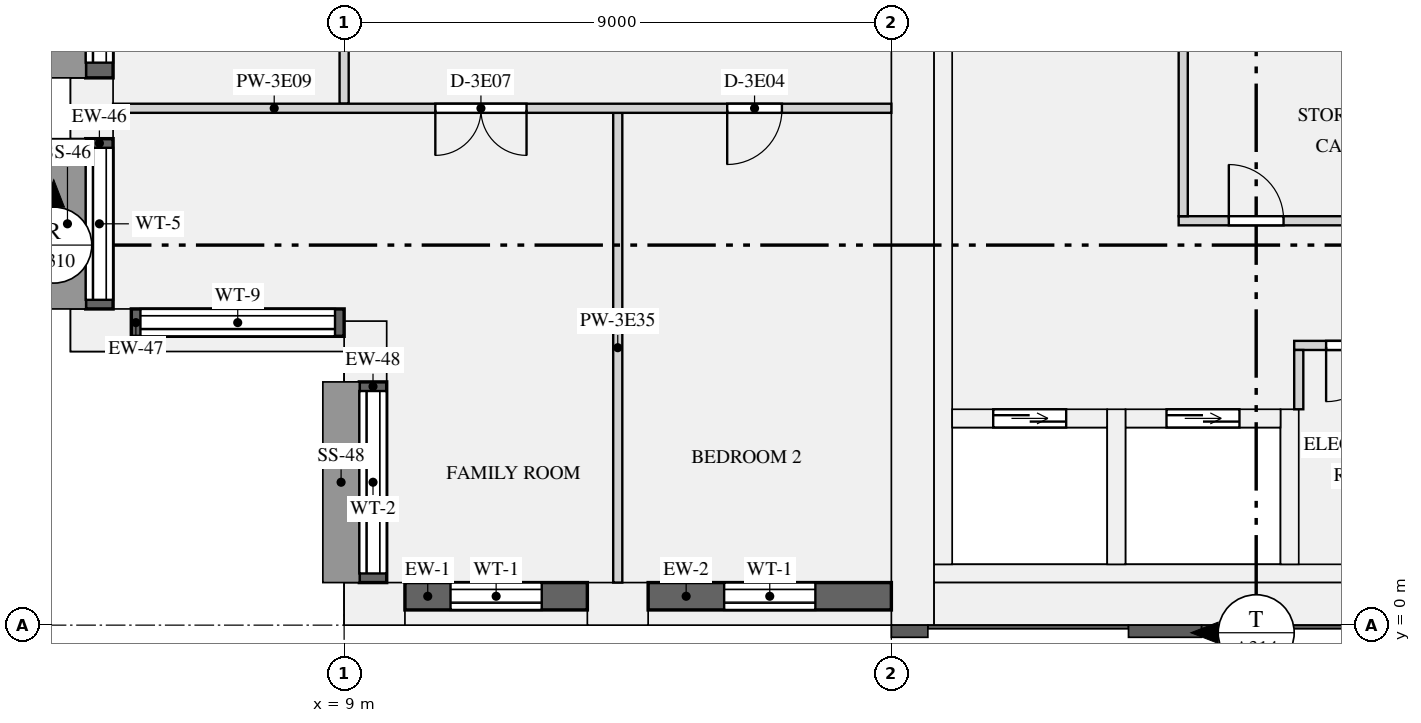
"""IFC4 building model, lengths in metres.
Left out: names, types, materials, properties, quantities, classifications, styles, units other than length and angle.
Written with IfcOpenShell. Run it as: python <this file> out.ifc"""

import sys

from ifc_helpers import new_model, si_unit, direction, frame, frame_2d, origin, origin_2d, place, context, subcontext, project, spatial, rectangle, extrude, element, fill, save


model = new_model("IFC4")
c1 = context("Model", 3, precision=1e-05, world=origin(), true_north=direction((0.0, 1.0)))
c2 = subcontext(c1, "Body", "Model", "MODEL_VIEW")
j1 = project(units=[si_unit("LENGTHUNIT", "METRE"), si_unit("PLANEANGLEUNIT", "RADIAN")], contexts=[c1])
p1 = place(None, origin())
s1 = spatial("IfcSite", under=j1, at=p1, CompositionType="ELEMENT")
p2 = place(p1, origin())
s2 = spatial("IfcBuilding", under=s1, at=p2, CompositionType="ELEMENT")
p3 = place(p2, frame((0.0, 0.0, 172.8)))
s3 = spatial("IfcBuildingStorey", under=s2, at=p3, CompositionType="ELEMENT", Elevation=172.8)
for number, where, z_axis, x_axis in (
    (1, (9.5, 0.35, 0.0), (0.0, 0.0, 1.0), (1.0, 0.0, 0.0)),
    (2, (13.5, 0.35, 0.0), (0.0, 0.0, 1.0), (1.0, 0.0, 0.0)),
    (3, (4.85, 8.5, 0.0), (0.0, 0.0, 1.0), (0.0, -1.0, 0.0)),
    (4, (5.0, 4.85, 0.0), (0.0, 0.0, 1.0), (1.0, 0.0, 0.0)),
    (5, (9.35, 4.5, 0.0), (0.0, 0.0, 1.0), (0.0, -1.0, 0.0)),
):
    element("IfcColumn", number, at=place(p3, frame(where, z_axis=z_axis, x_axis=x_axis)), inside=s3, PredefinedType="USERDEFINED", context=c2, shape_type="SweptSolid", body=[
        extrude(rectangle(XDim=1.0, YDim=0.7, at=origin_2d()), origin(), (0.0, 0.0, 1.0), 3.15),
    ])
p4 = place(p3, frame((18.35, 0.0, 0.0), z_axis=(0.0, 0.0, 1.0), x_axis=(0.0, 1.0, 0.0)))
e6 = element("IfcWall", 6, at=p4, inside=s3, PredefinedType="SHEAR", context=c2, shape_type="SweptSolid", body=[
    extrude(rectangle(XDim=12.5, YDim=0.7, at=frame_2d((6.25, 0.0))), origin(), (0.0, 0.0, 1.0), 3.15),
])
p5 = place(p3, frame((18.7, 0.35, 0.0), z_axis=(0.0, 0.0, 1.0), x_axis=(1.0, 0.0, 0.0)))
e7 = element("IfcWall", 7, at=p5, inside=s3, PredefinedType="SHEAR", context=c2, shape_type="SweptSolid", body=[
    extrude(rectangle(XDim=34.6, YDim=0.7, at=frame_2d((17.3, 0.0))), origin(), (0.0, 0.0, 1.0), 3.15),
])
p6 = place(p3, frame((18.85, 1.0, 0.0), z_axis=(0.0, 0.0, 1.0), x_axis=(0.0, 1.0, 0.0)))
e8 = element("IfcWall", 8, at=p6, inside=s3, PredefinedType="SHEAR", context=c2, shape_type="SweptSolid", body=[
    extrude(rectangle(XDim=10.9, YDim=0.3, at=frame_2d((5.45, 0.0))), origin(), (0.0, 0.0, 1.0), 3.15),
])
p7 = place(p3, frame((18.7, 0.85, 0.0), z_axis=(0.0, 0.0, 1.0), x_axis=(1.0, 0.0, 0.0)))
e9 = element("IfcWall", 9, at=p7, inside=s3, PredefinedType="SHEAR", context=c2, shape_type="SweptSolid", body=[
    extrude(rectangle(XDim=34.6, YDim=0.3, at=frame_2d((17.3, 0.0))), origin(), (0.0, 0.0, 1.0), 3.15),
])
p8 = place(p3, frame((19.0, 3.4, 0.0), z_axis=(0.0, 0.0, 1.0), x_axis=(1.0, 0.0, 0.0)))
e10 = element("IfcWall", 10, at=p8, inside=s3, PredefinedType="SHEAR", context=c2, shape_type="SweptSolid", body=[
    extrude(rectangle(XDim=2.55, YDim=0.3, at=frame_2d((1.275, 0.0))), origin(), (0.0, 0.0, 1.0), 3.15),
])
p9 = place(p8, frame((0.675, 0.0, 0.0)))
e11 = element("IfcOpeningElement", 11, at=p9, cuts=e10, PredefinedType="OPENING", context=c2, shape_type="SweptSolid", body=[
    extrude(rectangle(XDim=1.2, YDim=2.1, at=frame_2d((0.6, 1.05))), frame((0.0, 0.16, 0.0), z_axis=(0.0, -1.0, 0.0), x_axis=(1.0, 0.0, 0.0)), (0.0, 0.0, 1.0), 0.32),
])
p10 = place(p3, frame((21.85, 3.4, 0.0), z_axis=(0.0, 0.0, 1.0), x_axis=(1.0, 0.0, 0.0)))
e12 = element("IfcWall", 12, at=p10, inside=s3, PredefinedType="SHEAR", context=c2, shape_type="SweptSolid", body=[
    extrude(rectangle(XDim=2.55, YDim=0.3, at=frame_2d((1.275, 0.0))), origin(), (0.0, 0.0, 1.0), 3.15),
])
p11 = place(p10, frame((0.675, 0.0, 0.0)))
e13 = element("IfcOpeningElement", 13, at=p11, cuts=e12, PredefinedType="OPENING", context=c2, shape_type="SweptSolid", body=[
    extrude(rectangle(XDim=1.2, YDim=2.1, at=frame_2d((0.6, 1.05))), frame((0.0, 0.16, 0.0), z_axis=(0.0, -1.0, 0.0), x_axis=(1.0, 0.0, 0.0)), (0.0, 0.0, 1.0), 0.32),
])
for number, where, z_axis, x_axis in (
    (14, (21.7, 1.0, 0.0), (0.0, 0.0, 1.0), (0.0, 1.0, 0.0)),
    (15, (24.55, 1.0, 0.0), (0.0, 0.0, 1.0), (0.0, 1.0, 0.0)),
):
    element("IfcWall", number, at=place(p3, frame(where, z_axis=z_axis, x_axis=x_axis)), inside=s3, PredefinedType="SHEAR", context=c2, shape_type="SweptSolid", body=[
        extrude(rectangle(XDim=2.55, YDim=0.3, at=frame_2d((1.275, 0.0))), origin(), (0.0, 0.0, 1.0), 3.15),
    ])
p12 = place(p3, frame((10.0, 0.475, 0.9), z_axis=(0.0, 0.0, 1.0), x_axis=(1.0, 0.0, 0.0)))
e16 = element("IfcWall", 16, at=p12, inside=s3, PredefinedType="SOLIDWALL", context=c2, shape_type="SweptSolid", body=[
    extrude(rectangle(XDim=3.0, YDim=0.45, at=frame_2d((1.5, 0.0))), origin(), (0.0, 0.0, 1.0), 1.93),
])
p13 = place(p12, frame((0.75, 0.0, 0.15)))
e17 = element("IfcOpeningElement", 17, at=p13, cuts=e16, PredefinedType="OPENING", context=c2, shape_type="SweptSolid", body=[
    extrude(rectangle(XDim=1.5, YDim=1.5, at=frame_2d((0.75, 0.75))), frame((0.0, 0.235, 0.0), z_axis=(0.0, -1.0, 0.0), x_axis=(1.0, 0.0, 0.0)), (0.0, 0.0, 1.0), 0.47),
])
p14 = place(p3, frame((14.0, 0.475, 0.9), z_axis=(0.0, 0.0, 1.0), x_axis=(1.0, 0.0, 0.0)))
e18 = element("IfcWall", 18, at=p14, inside=s3, PredefinedType="SOLIDWALL", context=c2, shape_type="SweptSolid", body=[
    extrude(rectangle(XDim=4.0, YDim=0.45, at=frame_2d((2.0, 0.0))), origin(), (0.0, 0.0, 1.0), 1.93),
])
p15 = place(p14, frame((1.25, 0.0, 0.15)))
e19 = element("IfcOpeningElement", 19, at=p15, cuts=e18, PredefinedType="OPENING", context=c2, shape_type="SweptSolid", body=[
    extrude(rectangle(XDim=1.5, YDim=1.5, at=frame_2d((0.75, 0.75))), frame((0.0, 0.235, 0.0), z_axis=(0.0, -1.0, 0.0), x_axis=(1.0, 0.0, 0.0)), (0.0, 0.0, 1.0), 0.47),
])
p16 = place(p3, frame((4.975, 12.0, 0.9), z_axis=(0.0, 0.0, 1.0), x_axis=(0.0, -1.0, 0.0)))
e20 = element("IfcWall", 20, at=p16, inside=s3, PredefinedType="SOLIDWALL", context=c2, shape_type="SweptSolid", body=[
    extrude(rectangle(XDim=3.0, YDim=0.45, at=frame_2d((1.5, 0.0))), origin(), (0.0, 0.0, 1.0), 1.93),
])
p17 = place(p16, frame((0.25, 0.0, 0.15)))
e21 = element("IfcOpeningElement", 21, at=p17, cuts=e20, PredefinedType="OPENING", context=c2, shape_type="SweptSolid", body=[
    extrude(rectangle(XDim=2.5, YDim=1.5, at=frame_2d((1.25, 0.75))), frame((0.0, 0.235, 0.0), z_axis=(0.0, -1.0, 0.0), x_axis=(1.0, 0.0, 0.0)), (0.0, 0.0, 1.0), 0.47),
])
p18 = place(p3, frame((4.975, 8.0, 0.9), z_axis=(0.0, 0.0, 1.0), x_axis=(0.0, -1.0, 0.0)))
e22 = element("IfcWall", 22, at=p18, inside=s3, PredefinedType="SOLIDWALL", context=c2, shape_type="SweptSolid", body=[
    extrude(rectangle(XDim=2.8, YDim=0.45, at=frame_2d((1.4, 0.0))), origin(), (0.0, 0.0, 1.0), 1.93),
])
p19 = place(p18, frame((0.15, 0.0, 0.15)))
e23 = element("IfcOpeningElement", 23, at=p19, cuts=e22, PredefinedType="OPENING", context=c2, shape_type="SweptSolid", body=[
    extrude(rectangle(XDim=2.5, YDim=1.5, at=frame_2d((1.25, 0.75))), frame((0.0, 0.235, 0.0), z_axis=(0.0, -1.0, 0.0), x_axis=(1.0, 0.0, 0.0)), (0.0, 0.0, 1.0), 0.47),
])
p20 = place(p3, frame((5.5, 4.975, 0.9), z_axis=(0.0, 0.0, 1.0), x_axis=(1.0, 0.0, 0.0)))
e24 = element("IfcWall", 24, at=p20, inside=s3, PredefinedType="SOLIDWALL", context=c2, shape_type="SweptSolid", body=[
    extrude(rectangle(XDim=3.5, YDim=0.45, at=frame_2d((1.75, 0.0))), origin(), (0.0, 0.0, 1.0), 1.93),
])
p21 = place(p20, frame((0.15, 0.0, 0.15)))
e25 = element("IfcOpeningElement", 25, at=p21, cuts=e24, PredefinedType="OPENING", context=c2, shape_type="SweptSolid", body=[
    extrude(rectangle(XDim=3.2, YDim=1.5, at=frame_2d((1.6, 0.75))), frame((0.0, 0.235, 0.0), z_axis=(0.0, -1.0, 0.0), x_axis=(1.0, 0.0, 0.0)), (0.0, 0.0, 1.0), 0.47),
])
p22 = place(p3, frame((9.475, 4.0, 0.9), z_axis=(0.0, 0.0, 1.0), x_axis=(0.0, -1.0, 0.0)))
e26 = element("IfcWall", 26, at=p22, inside=s3, PredefinedType="SOLIDWALL", context=c2, shape_type="SweptSolid", body=[
    extrude(rectangle(XDim=3.3, YDim=0.45, at=frame_2d((1.65, 0.0))), origin(), (0.0, 0.0, 1.0), 1.93),
])
p23 = place(p22, frame((0.15, 0.0, 0.15)))
e27 = element("IfcOpeningElement", 27, at=p23, cuts=e26, PredefinedType="OPENING", context=c2, shape_type="SweptSolid", body=[
    extrude(rectangle(XDim=3.0, YDim=1.5, at=frame_2d((1.5, 0.75))), frame((0.0, 0.235, 0.0), z_axis=(0.0, -1.0, 0.0), x_axis=(1.0, 0.0, 0.0)), (0.0, 0.0, 1.0), 0.47),
])
p24 = place(p3, frame((24.625, 4.6, 0.0), z_axis=(0.0, 0.0, 1.0), x_axis=(1.0, 0.0, 0.0)))
e28 = element("IfcWall", 28, at=p24, inside=s3, PredefinedType="PARTITIONING", context=c2, shape_type="SweptSolid", body=[
    extrude(rectangle(XDim=2.675, YDim=0.15, at=frame_2d((1.337, 0.0))), origin(), (0.0, 0.0, 1.0), 2.83),
])
p25 = place(p24, frame((0.525, 0.0, 0.0)))
e29 = element("IfcOpeningElement", 29, at=p25, cuts=e28, PredefinedType="OPENING", context=c2, shape_type="SweptSolid", body=[
    extrude(rectangle(XDim=0.9, YDim=2.1, at=frame_2d((0.45, 1.05))), frame((0.0, 0.085, 0.0), z_axis=(0.0, -1.0, 0.0), x_axis=(1.0, 0.0, 0.0)), (0.0, 0.0, 1.0), 0.17),
])
p26 = place(p3, frame((22.725, 6.65, 0.0), z_axis=(0.0, 0.0, 1.0), x_axis=(1.0, 0.0, 0.0)))
e30 = element("IfcWall", 30, at=p26, inside=s3, PredefinedType="PARTITIONING", context=c2, shape_type="SweptSolid", body=[
    extrude(rectangle(XDim=19.8, YDim=0.15, at=frame_2d((9.9, 0.0))), origin(), (0.0, 0.0, 1.0), 2.83),
])
p27 = place(p26, frame((0.825, 0.0, 0.0)))
e31 = element("IfcOpeningElement", 31, at=p27, cuts=e30, PredefinedType="OPENING", context=c2, shape_type="SweptSolid", body=[
    extrude(rectangle(XDim=0.9, YDim=2.1, at=frame_2d((0.45, 1.05))), frame((0.0, 0.085, 0.0), z_axis=(0.0, -1.0, 0.0), x_axis=(1.0, 0.0, 0.0)), (0.0, 0.0, 1.0), 0.17),
])
p28 = place(p26, frame((5.825, 0.0, 0.0)))
e32 = element("IfcOpeningElement", 32, at=p28, cuts=e30, PredefinedType="OPENING", context=c2, shape_type="SweptSolid", body=[
    extrude(rectangle(XDim=0.9, YDim=2.1, at=frame_2d((0.45, 1.05))), frame((0.0, 0.085, 0.0), z_axis=(0.0, -1.0, 0.0), x_axis=(1.0, 0.0, 0.0)), (0.0, 0.0, 1.0), 0.17),
])
p29 = place(p26, frame((10.325, 0.0, 0.0)))
e33 = element("IfcOpeningElement", 33, at=p29, cuts=e30, PredefinedType="OPENING", context=c2, shape_type="SweptSolid", body=[
    extrude(rectangle(XDim=0.9, YDim=2.1, at=frame_2d((0.45, 1.05))), frame((0.0, 0.085, 0.0), z_axis=(0.0, -1.0, 0.0), x_axis=(1.0, 0.0, 0.0)), (0.0, 0.0, 1.0), 0.17),
])
p30 = place(p26, frame((14.475, 0.0, 0.0)))
e34 = element("IfcOpeningElement", 34, at=p30, cuts=e30, PredefinedType="OPENING", context=c2, shape_type="SweptSolid", body=[
    extrude(rectangle(XDim=0.9, YDim=2.1, at=frame_2d((0.45, 1.05))), frame((0.0, 0.085, 0.0), z_axis=(0.0, -1.0, 0.0), x_axis=(1.0, 0.0, 0.0)), (0.0, 0.0, 1.0), 0.17),
])
p31 = place(p3, frame((24.7, 3.55, 0.0), z_axis=(0.0, 0.0, 1.0), x_axis=(0.0, 1.0, 0.0)))
e35 = element("IfcWall", 35, at=p31, inside=s3, PredefinedType="PARTITIONING", context=c2, shape_type="SweptSolid", body=[
    extrude(rectangle(XDim=0.975, YDim=0.15, at=frame_2d((0.487, 0.0))), origin(), (0.0, 0.0, 1.0), 2.83),
])
p32 = place(p3, frame((22.8, 6.725, 0.0), z_axis=(0.0, 0.0, 1.0), x_axis=(0.0, 1.0, 0.0)))
e36 = element("IfcWall", 36, at=p32, inside=s3, PredefinedType="PARTITIONING", context=c2, shape_type="SweptSolid", body=[
    extrude(rectangle(XDim=5.175, YDim=0.15, at=frame_2d((2.587, 0.0))), origin(), (0.0, 0.0, 1.0), 2.83),
])
p33 = place(p3, frame((5.2, 8.5, 0.0), z_axis=(0.0, 0.0, 1.0), x_axis=(1.0, 0.0, 0.0)))
e37 = element("IfcWall", 37, at=p33, inside=s3, PredefinedType="PARTITIONING", context=c2, shape_type="SweptSolid", body=[
    extrude(rectangle(XDim=12.8, YDim=0.15, at=frame_2d((6.4, 0.0))), origin(), (0.0, 0.0, 1.0), 2.83),
])
p34 = place(p33, frame((10.1, 0.0, 0.0)))
e38 = element("IfcOpeningElement", 38, at=p34, cuts=e37, PredefinedType="OPENING", context=c2, shape_type="SweptSolid", body=[
    extrude(rectangle(XDim=0.9, YDim=2.1, at=frame_2d((0.45, 1.05))), frame((0.0, 0.085, 0.0), z_axis=(0.0, -1.0, 0.0), x_axis=(1.0, 0.0, 0.0)), (0.0, 0.0, 1.0), 0.17),
])
p35 = place(p33, frame((5.3, 0.0, 0.0)))
e39 = element("IfcOpeningElement", 39, at=p35, cuts=e37, PredefinedType="OPENING", context=c2, shape_type="SweptSolid", body=[
    extrude(rectangle(XDim=1.5, YDim=2.1, at=frame_2d((0.75, 1.05))), frame((0.0, 0.085, 0.0), z_axis=(0.0, -1.0, 0.0), x_axis=(1.0, 0.0, 0.0)), (0.0, 0.0, 1.0), 0.17),
])
p36 = place(p3, frame((13.5, 0.7, 0.0), z_axis=(0.0, 0.0, 1.0), x_axis=(0.0, 1.0, 0.0)))
e40 = element("IfcWall", 40, at=p36, inside=s3, PredefinedType="PARTITIONING", context=c2, shape_type="SweptSolid", body=[
    extrude(rectangle(XDim=7.725, YDim=0.15, at=frame_2d((3.863, 0.0))), origin(), (0.0, 0.0, 1.0), 2.83),
])
p37 = place(p3, frame((9.0, 8.575, 0.0), z_axis=(0.0, 0.0, 1.0), x_axis=(0.0, 1.0, 0.0)))
e41 = element("IfcWall", 41, at=p37, inside=s3, PredefinedType="PARTITIONING", context=c2, shape_type="SweptSolid", body=[
    extrude(rectangle(XDim=7.85, YDim=0.15, at=frame_2d((3.925, 0.0))), origin(), (0.0, 0.0, 1.0), 2.83),
])
p38 = place(p37, frame((1.2, 0.0, 0.0)))
e42 = element("IfcOpeningElement", 42, at=p38, cuts=e41, PredefinedType="OPENING", context=c2, shape_type="SweptSolid", body=[
    extrude(rectangle(XDim=0.9, YDim=2.1, at=frame_2d((0.45, 1.05))), frame((0.0, 0.085, 0.0), z_axis=(0.0, -1.0, 0.0), x_axis=(1.0, 0.0, 0.0)), (0.0, 0.0, 1.0), 0.17),
])
p39 = place(p13, origin())
e43 = element("IfcWindow", 43, at=p39, inside=s3, PartitioningType="SINGLE_PANEL", PredefinedType="WINDOW", context=c2, shape_type="SweptSolid", body=[
    extrude(rectangle(XDim=1.5, YDim=1.5, at=frame_2d((0.75, 0.75))), frame((0.0, -0.065, 0.0), z_axis=(0.0, -1.0, 0.0), x_axis=(1.0, 0.0, 0.0)), (0.0, 0.0, 1.0), 0.06),
])
fill(e17, e43)
p40 = place(p15, origin())
e44 = element("IfcWindow", 44, at=p40, inside=s3, PartitioningType="SINGLE_PANEL", PredefinedType="WINDOW", context=c2, shape_type="SweptSolid", body=[
    extrude(rectangle(XDim=1.5, YDim=1.5, at=frame_2d((0.75, 0.75))), frame((0.0, -0.065, 0.0), z_axis=(0.0, -1.0, 0.0), x_axis=(1.0, 0.0, 0.0)), (0.0, 0.0, 1.0), 0.06),
])
fill(e19, e44)
p41 = place(p17, origin())
e45 = element("IfcWindow", 45, at=p41, inside=s3, PartitioningType="SINGLE_PANEL", PredefinedType="WINDOW", context=c2, shape_type="SweptSolid", body=[
    extrude(rectangle(XDim=2.5, YDim=1.5, at=frame_2d((1.25, 0.75))), frame((0.0, -0.065, 0.0), z_axis=(0.0, -1.0, 0.0), x_axis=(1.0, 0.0, 0.0)), (0.0, 0.0, 1.0), 0.06),
])
fill(e21, e45)
p42 = place(p19, origin())
e46 = element("IfcWindow", 46, at=p42, inside=s3, PartitioningType="SINGLE_PANEL", PredefinedType="WINDOW", context=c2, shape_type="SweptSolid", body=[
    extrude(rectangle(XDim=2.5, YDim=1.5, at=frame_2d((1.25, 0.75))), frame((0.0, -0.065, 0.0), z_axis=(0.0, -1.0, 0.0), x_axis=(1.0, 0.0, 0.0)), (0.0, 0.0, 1.0), 0.06),
])
fill(e23, e46)
p43 = place(p21, origin())
e47 = element("IfcWindow", 47, at=p43, inside=s3, PartitioningType="SINGLE_PANEL", PredefinedType="WINDOW", context=c2, shape_type="SweptSolid", body=[
    extrude(rectangle(XDim=3.2, YDim=1.5, at=frame_2d((1.6, 0.75))), frame((0.0, -0.065, 0.0), z_axis=(0.0, -1.0, 0.0), x_axis=(1.0, 0.0, 0.0)), (0.0, 0.0, 1.0), 0.06),
])
fill(e25, e47)
p44 = place(p23, origin())
e48 = element("IfcWindow", 48, at=p44, inside=s3, PartitioningType="SINGLE_PANEL", PredefinedType="WINDOW", context=c2, shape_type="SweptSolid", body=[
    extrude(rectangle(XDim=3.0, YDim=1.5, at=frame_2d((1.5, 0.75))), frame((0.0, -0.065, 0.0), z_axis=(0.0, -1.0, 0.0), x_axis=(1.0, 0.0, 0.0)), (0.0, 0.0, 1.0), 0.06),
])
fill(e27, e48)
p45 = place(p9, origin())
e49 = element("IfcDoor", 49, at=p45, inside=s3, OperationType="DOUBLE_DOOR_SLIDING", PredefinedType="DOOR", context=c2, shape_type="SweptSolid", body=[
    extrude(rectangle(XDim=1.2, YDim=2.1, at=frame_2d((0.6, 1.05))), frame((0.0, 0.025, 0.0), z_axis=(0.0, -1.0, 0.0), x_axis=(1.0, 0.0, 0.0)), (0.0, 0.0, 1.0), 0.05),
])
fill(e11, e49)
p46 = place(p11, origin())
e50 = element("IfcDoor", 50, at=p46, inside=s3, OperationType="DOUBLE_DOOR_SLIDING", PredefinedType="DOOR", context=c2, shape_type="SweptSolid", body=[
    extrude(rectangle(XDim=1.2, YDim=2.1, at=frame_2d((0.6, 1.05))), frame((0.0, 0.025, 0.0), z_axis=(0.0, -1.0, 0.0), x_axis=(1.0, 0.0, 0.0)), (0.0, 0.0, 1.0), 0.05),
])
fill(e13, e50)
p47 = place(p25, frame((0.9, 0.0, 0.0), z_axis=(0.0, 0.0, 1.0), x_axis=(-1.0, 0.0, 0.0)))
e51 = element("IfcDoor", 51, at=p47, inside=s3, OperationType="SINGLE_SWING_RIGHT", PredefinedType="DOOR", context=c2, shape_type="SweptSolid", body=[
    extrude(rectangle(XDim=0.9, YDim=2.1, at=frame_2d((0.45, 1.05))), frame((0.0, 0.025, 0.0), z_axis=(0.0, -1.0, 0.0), x_axis=(1.0, 0.0, 0.0)), (0.0, 0.0, 1.0), 0.05),
])
fill(e29, e51)
p48 = place(p27, origin())
e52 = element("IfcDoor", 52, at=p48, inside=s3, OperationType="SINGLE_SWING_LEFT", PredefinedType="DOOR", context=c2, shape_type="SweptSolid", body=[
    extrude(rectangle(XDim=0.9, YDim=2.1, at=frame_2d((0.45, 1.05))), frame((0.0, 0.025, 0.0), z_axis=(0.0, -1.0, 0.0), x_axis=(1.0, 0.0, 0.0)), (0.0, 0.0, 1.0), 0.05),
])
fill(e31, e52)
p49 = place(p34, frame((0.9, 0.0, 0.0), z_axis=(0.0, 0.0, 1.0), x_axis=(-1.0, 0.0, 0.0)))
e53 = element("IfcDoor", 53, at=p49, inside=s3, OperationType="SINGLE_SWING_RIGHT", PredefinedType="DOOR", context=c2, shape_type="SweptSolid", body=[
    extrude(rectangle(XDim=0.9, YDim=2.1, at=frame_2d((0.45, 1.05))), frame((0.0, 0.025, 0.0), z_axis=(0.0, -1.0, 0.0), x_axis=(1.0, 0.0, 0.0)), (0.0, 0.0, 1.0), 0.05),
])
fill(e38, e53)
p50 = place(p35, frame((1.5, 0.0, 0.0), z_axis=(0.0, 0.0, 1.0), x_axis=(-1.0, 0.0, 0.0)))
e54 = element("IfcDoor", 54, at=p50, inside=s3, OperationType="DOUBLE_DOOR_SINGLE_SWING", PredefinedType="DOOR", context=c2, shape_type="SweptSolid", body=[
    extrude(rectangle(XDim=1.5, YDim=2.1, at=frame_2d((0.75, 1.05))), frame((0.0, 0.025, 0.0), z_axis=(0.0, -1.0, 0.0), x_axis=(1.0, 0.0, 0.0)), (0.0, 0.0, 1.0), 0.05),
])
fill(e39, e54)
save(model, sys.argv[1])
